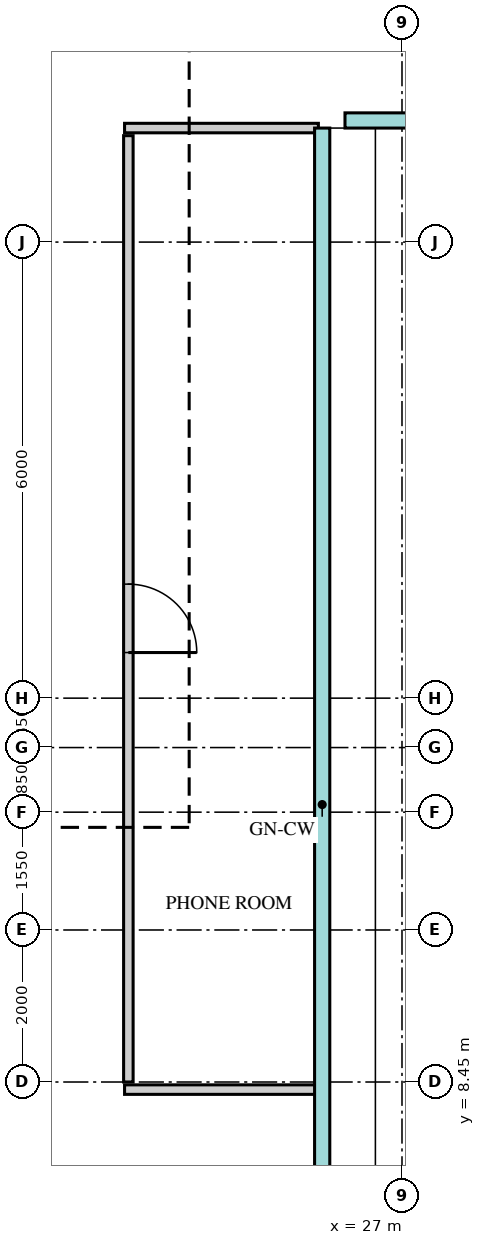
"""IFC4 building model, lengths in metres.
Left out: names, types, materials, properties, quantities, classifications, styles, units other than length and angle.
Written with IfcOpenShell. Run it as: python <this file> out.ifc"""

import sys

from ifc_helpers import new_model, si_unit, direction, frame, frame_2d, origin, place, context, subcontext, project, spatial, rectangle, extrude, source, transform, mapped, element, fill, save


model = new_model("IFC4")
c1 = context("Model", 3, precision=1e-05, world=origin(), true_north=direction((0.0, 1.0)))
c2 = subcontext(c1, "Body", "Model", "MODEL_VIEW")
j1 = project(units=[si_unit("LENGTHUNIT", "METRE"), si_unit("PLANEANGLEUNIT", "RADIAN")], contexts=[c1])
p1 = place(None, origin())
s1 = spatial("IfcSite", under=j1, at=p1, CompositionType="ELEMENT")
p2 = place(p1, origin())
s2 = spatial("IfcBuilding", under=s1, at=p2, CompositionType="ELEMENT")
p3 = place(p2, frame((0.0, 0.0, 168.7)))
s3 = spatial("IfcBuildingStorey", under=s2, at=p3, CompositionType="ELEMENT", Elevation=168.7)
m1 = source(origin(), c2, "Body", "SweptSolid", [
    extrude(rectangle(XDim=2.55, YDim=0.125, at=frame_2d((1.275, 0.0))), origin(), (0.0, 0.0, 1.0), 3.8),
])
p4 = place(p3, frame((23.35, 8.35, 0.0), z_axis=(0.0, 0.0, 1.0), x_axis=(1.0, 0.0, 0.0)))
e1 = element("IfcWall", 1, at=p4, inside=s3, PredefinedType="PARTITIONING", context=c2, shape_type="MappedRepresentation", body=[
    mapped(m1, transform((0.0, 0.0, 0.0))),
])
m2 = source(origin(), c2, "Body", "SweptSolid", [
    extrude(rectangle(XDim=12.45, YDim=0.125, at=frame_2d((6.225, 0.0))), origin(), (0.0, 0.0, 1.0), 3.8),
])
p5 = place(p3, frame((23.4, 8.45, 0.0), z_axis=(0.0, 0.0, 1.0), x_axis=(0.0, 1.0, 0.0)))
e2 = element("IfcWall", 2, at=p5, inside=s3, PredefinedType="PARTITIONING", context=c2, shape_type="MappedRepresentation", body=[
    mapped(m2, transform((0.0, 0.0, 0.0))),
])
m3 = source(origin(), c2, "Body", "SweptSolid", [
    extrude(rectangle(XDim=0.9, YDim=2.1, at=frame_2d((0.45, 1.05))), frame((0.0, 0.073, 0.0), z_axis=(0.0, -1.0, 0.0), x_axis=(1.0, 0.0, 0.0)), (0.0, 0.0, 1.0), 0.145),
])
p6 = place(p5, frame((5.65, 0.0, 0.0)))
e3 = element("IfcOpeningElement", 3, at=p6, cuts=e2, PredefinedType="OPENING", context=c2, shape_type="MappedRepresentation", body=[
    mapped(m3, transform((0.0, 0.0, 0.0))),
])
p7 = place(p3, frame((23.35, 21.0, 0.0), z_axis=(0.0, 0.0, 1.0), x_axis=(1.0, 0.0, 0.0)))
e4 = element("IfcWall", 4, at=p7, inside=s3, PredefinedType="PARTITIONING", context=c2, shape_type="MappedRepresentation", body=[
    mapped(m1, transform((0.0, 0.0, 0.0))),
])
m4 = source(origin(), c2, "Body", "SweptSolid", [
    extrude(rectangle(XDim=0.9, YDim=2.1, at=frame_2d((0.45, 1.05))), frame((0.0, 0.025, 0.0), z_axis=(0.0, -1.0, 0.0), x_axis=(1.0, 0.0, 0.0)), (0.0, 0.0, 1.0), 0.05),
])
p8 = place(p6, origin())
e5 = element("IfcDoor", 5, at=p8, inside=s3, OperationType="SINGLE_SWING_LEFT", PredefinedType="DOOR", context=c2, shape_type="MappedRepresentation", body=[
    mapped(m4, transform((0.0, 0.0, 0.0))),
])
fill(e3, e5)
save(model, sys.argv[1])
